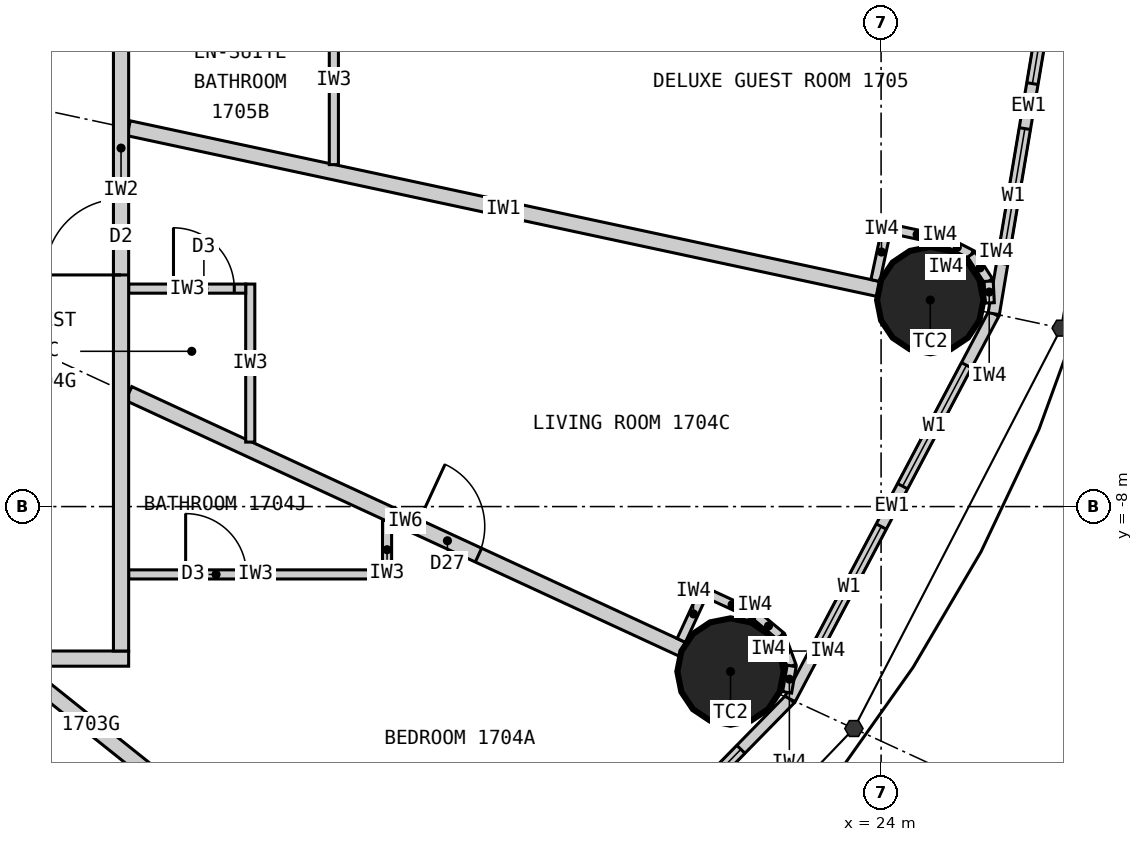
"""IFC4 building model, lengths in metres.
Left out: names, types, materials, properties, quantities, classifications, styles, units other than length and angle.
Written with IfcOpenShell. Run it as: python <this file> out.ifc"""

import sys

from ifc_helpers import new_model, si_unit, direction, frame, frame_2d, origin, origin_2d, place, context, subcontext, project, spatial, rectangle, circle, extrude, element, fill, save


model = new_model("IFC4")
c1 = context("Model", 3, precision=1e-05, world=origin(), true_north=direction((0.0, 1.0)))
c2 = subcontext(c1, "Body", "Model", "MODEL_VIEW")
j1 = project(units=[si_unit("LENGTHUNIT", "METRE"), si_unit("PLANEANGLEUNIT", "RADIAN")], contexts=[c1])
p1 = place(None, origin())
s1 = spatial("IfcSite", under=j1, at=p1, CompositionType="ELEMENT")
p2 = place(p1, origin())
s2 = spatial("IfcBuilding", under=s1, at=p2, CompositionType="ELEMENT")
p3 = place(p2, frame((0.0, 0.0, 70.5)))
s3 = spatial("IfcBuildingStorey", under=s2, at=p3, CompositionType="ELEMENT", Elevation=70.5)
for number, where, z_axis, x_axis in (
    (1, (22.019, -10.17, 0.0), (0.0, 0.0, 1.0), (1.0, 0.0, 0.0)),
    (2, (24.647, -5.283, 0.0), (0.0, 0.0, 1.0), (1.0, 0.0, 0.0)),
):
    element("IfcColumn", number, at=place(p3, frame(where, z_axis=z_axis, x_axis=x_axis)), inside=s3, PredefinedType="COLUMN", context=c2, shape_type="SweptSolid", body=[
        extrude(circle(Radius=0.7, at=origin_2d()), origin(), (0.0, 0.0, 1.0), 3.3),
    ])
p4 = place(p3, frame((18.57, -14.856, 0.0), z_axis=(0.0, 0.0, 1.0), x_axis=(0.699602905915, 0.714531856557, 0.0)))
e3 = element("IfcWall", 3, at=p4, inside=s3, PredefinedType="ELEMENTEDWALL", context=c2, shape_type="SweptSolid", body=[
    extrude(rectangle(XDim=6.051, YDim=0.15, at=frame_2d((3.025, 0.0))), origin(), (0.0, 0.0, 1.0), 3.12),
])
p5 = place(p4, frame((0.926, 0.0, 0.9)))
e4 = element("IfcOpeningElement", 4, at=p5, cuts=e3, PredefinedType="OPENING", context=c2, shape_type="SweptSolid", body=[
    extrude(rectangle(XDim=1.8, YDim=1.9, at=frame_2d((0.9, 0.95))), frame((0.0, 0.085, 0.0), z_axis=(0.0, -1.0, 0.0), x_axis=(1.0, 0.0, 0.0)), (0.0, 0.0, 1.0), 0.17),
])
p6 = place(p4, frame((3.325, 0.0, 0.9)))
e5 = element("IfcOpeningElement", 5, at=p6, cuts=e3, PredefinedType="OPENING", context=c2, shape_type="SweptSolid", body=[
    extrude(rectangle(XDim=1.8, YDim=1.9, at=frame_2d((0.9, 0.95))), frame((0.0, 0.085, 0.0), z_axis=(0.0, -1.0, 0.0), x_axis=(1.0, 0.0, 0.0)), (0.0, 0.0, 1.0), 0.17),
])
p7 = place(p3, frame((22.803, -10.532, 0.0), z_axis=(0.0, 0.0, 1.0), x_axis=(0.467296867008, 0.884100468321, 0.0)))
e6 = element("IfcWall", 6, at=p7, inside=s3, PredefinedType="ELEMENTEDWALL", context=c2, shape_type="SweptSolid", body=[
    extrude(rectangle(XDim=5.734, YDim=0.15, at=frame_2d((2.867, 0.0))), origin(), (0.0, 0.0, 1.0), 3.12),
])
p8 = place(p7, frame((0.767, 0.0, 0.9)))
e7 = element("IfcOpeningElement", 7, at=p8, cuts=e6, PredefinedType="OPENING", context=c2, shape_type="SweptSolid", body=[
    extrude(rectangle(XDim=1.8, YDim=1.9, at=frame_2d((0.9, 0.95))), frame((0.0, 0.085, 0.0), z_axis=(0.0, -1.0, 0.0), x_axis=(1.0, 0.0, 0.0)), (0.0, 0.0, 1.0), 0.17),
])
p9 = place(p7, frame((3.167, 0.0, 0.9)))
e8 = element("IfcOpeningElement", 8, at=p9, cuts=e6, PredefinedType="OPENING", context=c2, shape_type="SweptSolid", body=[
    extrude(rectangle(XDim=1.8, YDim=1.9, at=frame_2d((0.9, 0.95))), frame((0.0, 0.085, 0.0), z_axis=(0.0, -1.0, 0.0), x_axis=(1.0, 0.0, 0.0)), (0.0, 0.0, 1.0), 0.17),
])
p10 = place(p3, frame((25.482, -5.462, 0.0), z_axis=(0.0, 0.0, 1.0), x_axis=(0.165642551694, 0.986185857264, 0.0)))
e9 = element("IfcWall", 9, at=p10, inside=s3, PredefinedType="ELEMENTEDWALL", context=c2, shape_type="SweptSolid", body=[
    extrude(rectangle(XDim=5.539, YDim=0.15, at=frame_2d((2.77, 0.0))), origin(), (0.0, 0.0, 1.0), 3.12),
])
p11 = place(p10, frame((0.669, 0.0, 0.9)))
e10 = element("IfcOpeningElement", 10, at=p11, cuts=e9, PredefinedType="OPENING", context=c2, shape_type="SweptSolid", body=[
    extrude(rectangle(XDim=1.8, YDim=1.9, at=frame_2d((0.9, 0.95))), frame((0.0, 0.085, 0.0), z_axis=(0.0, -1.0, 0.0), x_axis=(1.0, 0.0, 0.0)), (0.0, 0.0, 1.0), 0.17),
])
p12 = place(p10, frame((3.07, 0.0, 0.9)))
e11 = element("IfcOpeningElement", 11, at=p12, cuts=e9, PredefinedType="OPENING", context=c2, shape_type="SweptSolid", body=[
    extrude(rectangle(XDim=1.8, YDim=1.9, at=frame_2d((0.9, 0.95))), frame((0.0, 0.085, 0.0), z_axis=(0.0, -1.0, 0.0), x_axis=(1.0, 0.0, 0.0)), (0.0, 0.0, 1.0), 0.17),
])
p13 = place(p3, frame((14.1, -10.0, 0.0), z_axis=(0.0, 0.0, 1.0), x_axis=(-1.0, 0.0, 0.0)))
e12 = element("IfcWall", 12, at=p13, inside=s3, PredefinedType="PARTITIONING", context=c2, shape_type="SweptSolid", body=[
    extrude(rectangle(XDim=28.2, YDim=0.2, at=frame_2d((14.1, 0.0))), origin(), (0.0, 0.0, 1.0), 3.12),
])
p14 = place(p13, frame((24.165, 0.0, 0.0)))
e13 = element("IfcOpeningElement", 13, at=p14, cuts=e12, PredefinedType="OPENING", context=c2, shape_type="SweptSolid", body=[
    extrude(rectangle(XDim=1.0, YDim=2.2, at=frame_2d((0.5, 1.1))), frame((0.0, 0.11, 0.0), z_axis=(0.0, -1.0, 0.0), x_axis=(1.0, 0.0, 0.0)), (0.0, 0.0, 1.0), 0.22),
])
p15 = place(p13, frame((14.923, 0.0, 0.0)))
e14 = element("IfcOpeningElement", 14, at=p15, cuts=e12, PredefinedType="OPENING", context=c2, shape_type="SweptSolid", body=[
    extrude(rectangle(XDim=1.0, YDim=2.2, at=frame_2d((0.5, 1.1))), frame((0.0, 0.11, 0.0), z_axis=(0.0, -1.0, 0.0), x_axis=(1.0, 0.0, 0.0)), (0.0, 0.0, 1.0), 0.22),
])
p16 = place(p13, frame((3.035, 0.0, 0.0)))
e15 = element("IfcOpeningElement", 15, at=p16, cuts=e12, PredefinedType="OPENING", context=c2, shape_type="SweptSolid", body=[
    extrude(rectangle(XDim=1.0, YDim=2.2, at=frame_2d((0.5, 1.1))), frame((0.0, 0.11, 0.0), z_axis=(0.0, -1.0, 0.0), x_axis=(1.0, 0.0, 0.0)), (0.0, 0.0, 1.0), 0.22),
])
p17 = place(p3, frame((12.625, -10.1, 0.0), z_axis=(0.0, 0.0, 1.0), x_axis=(0.780892451574, -0.624665493744, 0.0)))
e16 = element("IfcWall", 16, at=p17, inside=s3, PredefinedType="PARTITIONING", context=c2, shape_type="SweptSolid", body=[
    extrude(rectangle(XDim=6.045, YDim=0.2, at=frame_2d((3.022, 0.0))), origin(), (0.0, 0.0, 1.0), 2.32),
])
p18 = place(p3, frame((14.1, -6.512, 0.0), z_axis=(0.0, 0.0, 1.0), x_axis=(0.907832871056, -0.419332181247, 0.0)))
e17 = element("IfcWall", 17, at=p18, inside=s3, PredefinedType="PARTITIONING", context=c2, shape_type="SweptSolid", body=[
    extrude(rectangle(XDim=8.023, YDim=0.2, at=frame_2d((4.011, 0.0))), origin(), (0.0, 0.0, 1.0), 2.32),
])
p19 = place(p18, frame((4.17, 0.0, 0.0)))
e18 = element("IfcOpeningElement", 18, at=p19, cuts=e17, PredefinedType="OPENING", context=c2, shape_type="SweptSolid", body=[
    extrude(rectangle(XDim=0.9, YDim=2.1, at=frame_2d((0.45, 1.05))), frame((0.0, 0.11, 0.0), z_axis=(0.0, -1.0, 0.0), x_axis=(1.0, 0.0, 0.0)), (0.0, 0.0, 1.0), 0.22),
])
p20 = place(p3, frame((14.1, -3.022, 0.0), z_axis=(0.0, 0.0, 1.0), x_axis=(0.977790014929, -0.209586943072, 0.0)))
e19 = element("IfcWall", 19, at=p20, inside=s3, PredefinedType="PARTITIONING", context=c2, shape_type="SweptSolid", body=[
    extrude(rectangle(XDim=10.087, YDim=0.2, at=frame_2d((5.043, 0.0))), origin(), (0.0, 0.0, 1.0), 2.32),
])
p21 = place(p3, frame((17.5, -8.183, 0.0), z_axis=(0.0, 0.0, 1.0), x_axis=(0.0, -1.0, 0.0)))
e20 = element("IfcWall", 20, at=p21, inside=s3, PredefinedType="PARTITIONING", context=c2, shape_type="SweptSolid", body=[
    extrude(rectangle(XDim=0.77, YDim=0.12, at=frame_2d((0.385, 0.0))), origin(), (0.0, 0.0, 1.0), 3.12),
])
p22 = place(p3, frame((14.1, -8.893, 0.0), z_axis=(0.0, 0.0, 1.0), x_axis=(1.0, 0.0, 0.0)))
e21 = element("IfcWall", 21, at=p22, inside=s3, PredefinedType="PARTITIONING", context=c2, shape_type="SweptSolid", body=[
    extrude(rectangle(XDim=3.34, YDim=0.12, at=frame_2d((1.67, 0.0))), origin(), (0.0, 0.0, 1.0), 3.12),
])
p23 = place(p22, frame((0.75, 0.0, 0.0)))
e22 = element("IfcOpeningElement", 22, at=p23, cuts=e21, PredefinedType="OPENING", context=c2, shape_type="SweptSolid", body=[
    extrude(rectangle(XDim=0.8, YDim=2.1, at=frame_2d((0.4, 1.05))), frame((0.0, 0.07, 0.0), z_axis=(0.0, -1.0, 0.0), x_axis=(1.0, 0.0, 0.0)), (0.0, 0.0, 1.0), 0.14),
])
p24 = place(p3, frame((15.7, -7.152, 0.0), z_axis=(0.0, 0.0, 1.0), x_axis=(0.0, 1.0, 0.0)))
e23 = element("IfcWall", 23, at=p24, inside=s3, PredefinedType="PARTITIONING", context=c2, shape_type="SweptSolid", body=[
    extrude(rectangle(XDim=2.079, YDim=0.12, at=frame_2d((1.04, 0.0))), origin(), (0.0, 0.0, 1.0), 3.12),
])
p25 = place(p3, frame((14.1, -5.133, 0.0), z_axis=(0.0, 0.0, 1.0), x_axis=(1.0, 0.0, 0.0)))
e24 = element("IfcWall", 24, at=p25, inside=s3, PredefinedType="PARTITIONING", context=c2, shape_type="SweptSolid", body=[
    extrude(rectangle(XDim=1.54, YDim=0.12, at=frame_2d((0.77, 0.0))), origin(), (0.0, 0.0, 1.0), 3.12),
])
p26 = place(p25, frame((0.59, 0.0, 0.0)))
e25 = element("IfcOpeningElement", 25, at=p26, cuts=e24, PredefinedType="OPENING", context=c2, shape_type="SweptSolid", body=[
    extrude(rectangle(XDim=0.8, YDim=2.1, at=frame_2d((0.4, 1.05))), frame((0.0, 0.07, 0.0), z_axis=(0.0, -1.0, 0.0), x_axis=(1.0, 0.0, 0.0)), (0.0, 0.0, 1.0), 0.14),
])
p27 = place(p3, frame((16.8, -3.501, 0.0), z_axis=(0.0, 0.0, 1.0), x_axis=(0.0, 1.0, 0.0)))
e26 = element("IfcWall", 26, at=p27, inside=s3, PredefinedType="PARTITIONING", context=c2, shape_type="SweptSolid", body=[
    extrude(rectangle(XDim=2.219, YDim=0.12, at=frame_2d((1.109, 0.0))), origin(), (0.0, 0.0, 1.0), 3.12),
])
p28 = place(p3, frame((14.0, -9.9, 0.0), z_axis=(0.0, 0.0, 1.0), x_axis=(0.0, 1.0, 0.0)))
e27 = element("IfcWall", 27, at=p28, inside=s3, PredefinedType="PARTITIONING", context=c2, shape_type="SweptSolid", body=[
    extrude(rectangle(XDim=13.232, YDim=0.2, at=frame_2d((6.616, 0.0))), origin(), (0.0, 0.0, 1.0), 3.12),
])
p29 = place(p28, frame((4.948, 0.0, 0.0)))
e28 = element("IfcOpeningElement", 28, at=p29, cuts=e27, PredefinedType="OPENING", context=c2, shape_type="SweptSolid", body=[
    extrude(rectangle(XDim=1.0, YDim=2.2, at=frame_2d((0.5, 1.1))), frame((0.0, 0.11, 0.0), z_axis=(0.0, -1.0, 0.0), x_axis=(1.0, 0.0, 0.0)), (0.0, 0.0, 1.0), 0.22),
])
p30 = place(p28, frame((8.718, 0.0, 0.0)))
e29 = element("IfcOpeningElement", 29, at=p30, cuts=e27, PredefinedType="OPENING", context=c2, shape_type="SweptSolid", body=[
    extrude(rectangle(XDim=1.0, YDim=2.2, at=frame_2d((0.5, 1.1))), frame((0.0, 0.11, 0.0), z_axis=(0.0, -1.0, 0.0), x_axis=(1.0, 0.0, 0.0)), (0.0, 0.0, 1.0), 0.22),
])
p31 = place(p28, frame((11.74, 0.0, 0.0)))
e30 = element("IfcOpeningElement", 30, at=p31, cuts=e27, PredefinedType="OPENING", context=c2, shape_type="SweptSolid", body=[
    extrude(rectangle(XDim=1.0, YDim=2.2, at=frame_2d((0.5, 1.1))), frame((0.0, 0.11, 0.0), z_axis=(0.0, -1.0, 0.0), x_axis=(1.0, 0.0, 0.0)), (0.0, 0.0, 1.0), 0.22),
])
p32 = place(p3, frame((21.371, -9.761, 0.0), z_axis=(0.0, 0.0, 1.0), x_axis=(0.419259891039, 0.907866258744, 0.0)))
e31 = element("IfcWall", 31, at=p32, inside=s3, PredefinedType="PARTITIONING", context=c2, shape_type="SweptSolid", body=[
    extrude(rectangle(XDim=0.768, YDim=0.12, at=frame_2d((0.384, 0.0))), origin(), (0.0, 0.0, 1.0), 3.12),
])
p33 = place(p3, frame((21.722, -9.144, 0.0), z_axis=(0.0, 0.0, 1.0), x_axis=(0.907877701396, -0.419235112208, 0.0)))
e32 = element("IfcWall", 32, at=p33, inside=s3, PredefinedType="PARTITIONING", context=c2, shape_type="SweptSolid", body=[
    extrude(rectangle(XDim=0.7, YDim=0.12, at=frame_2d((0.35, 0.0))), origin(), (0.0, 0.0, 1.0), 3.12),
])
p34 = place(p3, frame((22.358, -9.437, 0.0), z_axis=(0.0, 0.0, 1.0), x_axis=(0.768412687942, -0.639954639806, 0.0)))
e33 = element("IfcWall", 33, at=p34, inside=s3, PredefinedType="PARTITIONING", context=c2, shape_type="SweptSolid", body=[
    extrude(rectangle(XDim=0.418, YDim=0.12, at=frame_2d((0.209, 0.0))), origin(), (0.0, 0.0, 1.0), 3.12),
])
p35 = place(p3, frame((22.679, -9.705, 0.0), z_axis=(0.0, 0.0, 1.0), x_axis=(0.345164001646, -0.938542386879, 0.0)))
e34 = element("IfcWall", 34, at=p35, inside=s3, PredefinedType="PARTITIONING", context=c2, shape_type="SweptSolid", body=[
    extrude(rectangle(XDim=0.418, YDim=0.12, at=frame_2d((0.209, 0.0))), origin(), (0.0, 0.0, 1.0), 3.12),
])
p36 = place(p3, frame((22.823, -10.097, 0.0), z_axis=(0.0, 0.0, 1.0), x_axis=(-0.169674995186, -0.985500074079, 0.0)))
e35 = element("IfcWall", 35, at=p36, inside=s3, PredefinedType="PARTITIONING", context=c2, shape_type="SweptSolid", body=[
    extrude(rectangle(XDim=0.353, YDim=0.12, at=frame_2d((0.176, 0.0))), origin(), (0.0, 0.0, 1.0), 3.12),
])
p37 = place(p3, frame((23.925, -5.026, 0.0), z_axis=(0.0, 0.0, 1.0), x_axis=(0.209681192172, 0.977769808109, 0.0)))
e36 = element("IfcWall", 36, at=p37, inside=s3, PredefinedType="PARTITIONING", context=c2, shape_type="SweptSolid", body=[
    extrude(rectangle(XDim=0.767, YDim=0.12, at=frame_2d((0.384, 0.0))), origin(), (0.0, 0.0, 1.0), 3.12),
])
p38 = place(p3, frame((24.132, -4.347, 0.0), z_axis=(0.0, 0.0, 1.0), x_axis=(0.977776882509, -0.209648200638, 0.0)))
e37 = element("IfcWall", 37, at=p38, inside=s3, PredefinedType="PARTITIONING", context=c2, shape_type="SweptSolid", body=[
    extrude(rectangle(XDim=0.7, YDim=0.12, at=frame_2d((0.35, 0.0))), origin(), (0.0, 0.0, 1.0), 3.12),
])
for number, where, z_axis, x_axis in (
    (38, (24.816, -4.494, 0.0), (0.0, 0.0, 1.0), (0.89, -0.455, 0.0)),
    (39, (25.188, -4.684, 0.0), (0.0, 0.0, 1.0), (0.543, -0.84, 0.0)),
):
    element("IfcWall", number, at=place(p3, frame(where, z_axis=z_axis, x_axis=x_axis)), inside=s3, PredefinedType="PARTITIONING", context=c2, shape_type="SweptSolid", body=[
        extrude(rectangle(XDim=0.418, YDim=0.12, at=frame_2d((0.209, 0.0))), origin(), (0.0, 0.0, 1.0), 3.12),
    ])
p39 = place(p3, frame((25.416, -5.035, 0.0), z_axis=(0.0, 0.0, 1.0), x_axis=(0.050406329159, -0.998728793007, 0.0)))
e40 = element("IfcWall", 40, at=p39, inside=s3, PredefinedType="PARTITIONING", context=c2, shape_type="SweptSolid", body=[
    extrude(rectangle(XDim=0.286, YDim=0.12, at=frame_2d((0.143, 0.0))), origin(), (0.0, 0.0, 1.0), 3.12),
])
p40 = place(p6, origin())
e41 = element("IfcWindow", 41, at=p40, inside=s3, PartitioningType="SINGLE_PANEL", PredefinedType="WINDOW", context=c2, shape_type="SweptSolid", body=[
    extrude(rectangle(XDim=1.8, YDim=1.9, at=frame_2d((0.9, 0.95))), frame((0.0, 0.03, 0.0), z_axis=(0.0, -1.0, 0.0), x_axis=(1.0, 0.0, 0.0)), (0.0, 0.0, 1.0), 0.06),
])
fill(e5, e41)
p41 = place(p8, origin())
e42 = element("IfcWindow", 42, at=p41, inside=s3, PartitioningType="SINGLE_PANEL", PredefinedType="WINDOW", context=c2, shape_type="SweptSolid", body=[
    extrude(rectangle(XDim=1.8, YDim=1.9, at=frame_2d((0.9, 0.95))), frame((0.0, 0.03, 0.0), z_axis=(0.0, -1.0, 0.0), x_axis=(1.0, 0.0, 0.0)), (0.0, 0.0, 1.0), 0.06),
])
fill(e7, e42)
p42 = place(p9, origin())
e43 = element("IfcWindow", 43, at=p42, inside=s3, PartitioningType="SINGLE_PANEL", PredefinedType="WINDOW", context=c2, shape_type="SweptSolid", body=[
    extrude(rectangle(XDim=1.8, YDim=1.9, at=frame_2d((0.9, 0.95))), frame((0.0, 0.03, 0.0), z_axis=(0.0, -1.0, 0.0), x_axis=(1.0, 0.0, 0.0)), (0.0, 0.0, 1.0), 0.06),
])
fill(e8, e43)
p43 = place(p11, origin())
e44 = element("IfcWindow", 44, at=p43, inside=s3, PartitioningType="SINGLE_PANEL", PredefinedType="WINDOW", context=c2, shape_type="SweptSolid", body=[
    extrude(rectangle(XDim=1.8, YDim=1.9, at=frame_2d((0.9, 0.95))), frame((0.0, 0.03, 0.0), z_axis=(0.0, -1.0, 0.0), x_axis=(1.0, 0.0, 0.0)), (0.0, 0.0, 1.0), 0.06),
])
fill(e10, e44)
p44 = place(p12, origin())
e45 = element("IfcWindow", 45, at=p44, inside=s3, PartitioningType="SINGLE_PANEL", PredefinedType="WINDOW", context=c2, shape_type="SweptSolid", body=[
    extrude(rectangle(XDim=1.8, YDim=1.9, at=frame_2d((0.9, 0.95))), frame((0.0, 0.03, 0.0), z_axis=(0.0, -1.0, 0.0), x_axis=(1.0, 0.0, 0.0)), (0.0, 0.0, 1.0), 0.06),
])
fill(e11, e45)
p45 = place(p23, origin())
e46 = element("IfcDoor", 46, at=p45, inside=s3, OperationType="SINGLE_SWING_LEFT", PredefinedType="DOOR", context=c2, shape_type="SweptSolid", body=[
    extrude(rectangle(XDim=0.8, YDim=2.1, at=frame_2d((0.4, 1.05))), frame((0.0, 0.025, 0.0), z_axis=(0.0, -1.0, 0.0), x_axis=(1.0, 0.0, 0.0)), (0.0, 0.0, 1.0), 0.05),
])
fill(e22, e46)
p46 = place(p26, origin())
e47 = element("IfcDoor", 47, at=p46, inside=s3, OperationType="SINGLE_SWING_LEFT", PredefinedType="DOOR", context=c2, shape_type="SweptSolid", body=[
    extrude(rectangle(XDim=0.8, YDim=2.1, at=frame_2d((0.4, 1.05))), frame((0.0, 0.025, 0.0), z_axis=(0.0, -1.0, 0.0), x_axis=(1.0, 0.0, 0.0)), (0.0, 0.0, 1.0), 0.05),
])
fill(e25, e47)
p47 = place(p29, origin())
e48 = element("IfcDoor", 48, at=p47, inside=s3, OperationType="SINGLE_SWING_LEFT", PredefinedType="DOOR", context=c2, shape_type="SweptSolid", body=[
    extrude(rectangle(XDim=1.0, YDim=2.2, at=frame_2d((0.5, 1.1))), frame((0.0, 0.025, 0.0), z_axis=(0.0, -1.0, 0.0), x_axis=(1.0, 0.0, 0.0)), (0.0, 0.0, 1.0), 0.05),
])
fill(e28, e48)
p48 = place(p19, origin())
e49 = element("IfcDoor", 49, at=p48, inside=s3, OperationType="SINGLE_SWING_LEFT", PredefinedType="DOOR", context=c2, shape_type="SweptSolid", body=[
    extrude(rectangle(XDim=0.9, YDim=2.1, at=frame_2d((0.45, 1.05))), frame((0.0, 0.025, 0.0), z_axis=(0.0, -1.0, 0.0), x_axis=(1.0, 0.0, 0.0)), (0.0, 0.0, 1.0), 0.05),
])
fill(e18, e49)
save(model, sys.argv[1])
